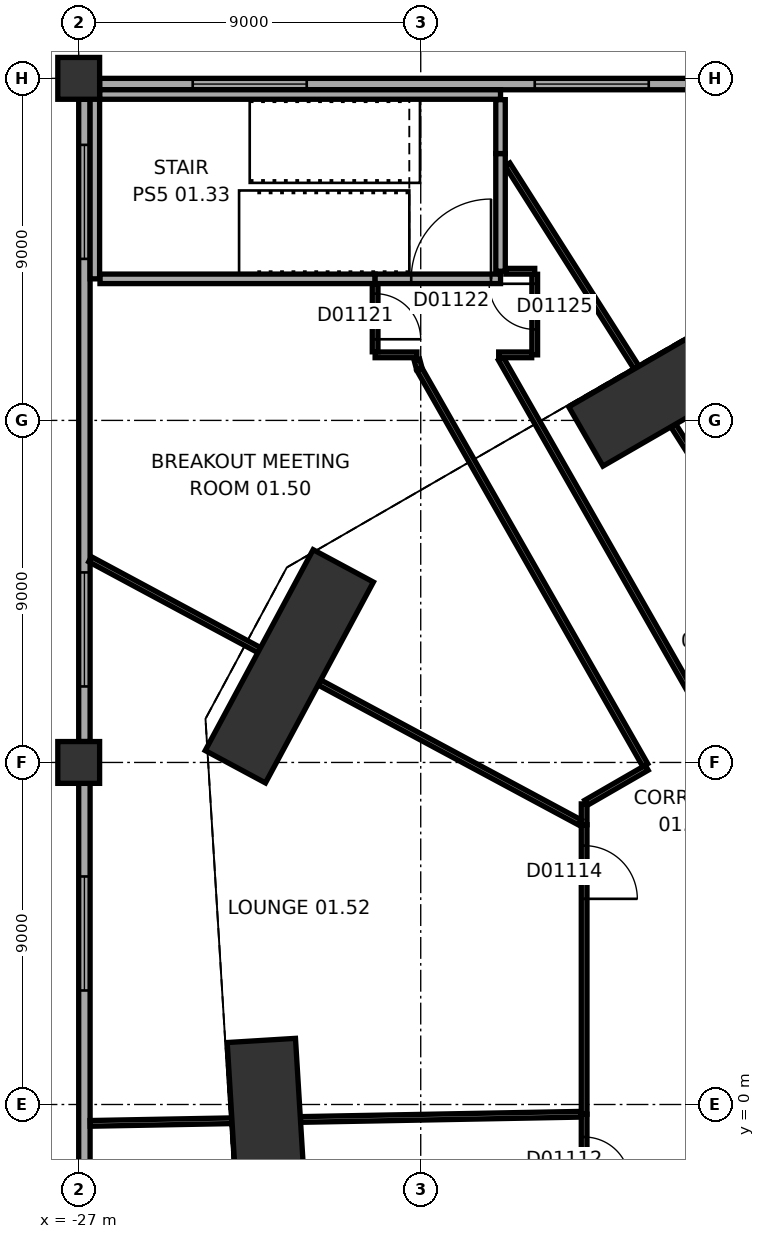
"""IFC4 building model, lengths in metres.
Left out: names, types, materials, properties, quantities, classifications, styles, units other than length and angle.
Written with IfcOpenShell. Run it as: python <this file> out.ifc"""

import sys

from ifc_helpers import new_model, si_unit, direction, frame, frame_2d, origin, origin_2d, place, context, subcontext, project, spatial, rectangle, extrude, element, fill, save


model = new_model("IFC4")
c1 = context("Model", 3, precision=1e-05, world=origin(), true_north=direction((0.0, 1.0)))
c2 = subcontext(c1, "Body", "Model", "MODEL_VIEW")
j1 = project(units=[si_unit("LENGTHUNIT", "METRE"), si_unit("PLANEANGLEUNIT", "RADIAN")], contexts=[c1])
p1 = place(None, origin())
s1 = spatial("IfcSite", under=j1, at=p1, CompositionType="ELEMENT")
p2 = place(p1, origin())
s2 = spatial("IfcBuilding", under=s1, at=p2, CompositionType="ELEMENT")
p3 = place(p2, frame((0.0, 0.0, 7.5)))
s3 = spatial("IfcBuildingStorey", under=s2, at=p3, CompositionType="ELEMENT", Elevation=7.5)
p4 = place(p3, frame((-11.837, 18.627, 0.0), z_axis=(0.0, 0.0, 1.0), x_axis=(-0.866028021766, -0.499995465495, 0.0)))
e1 = element("IfcColumn", 1, at=p4, inside=s3, PredefinedType="COLUMN", context=c2, shape_type="SweptSolid", body=[
    extrude(rectangle(XDim=4.2, YDim=1.8, at=origin_2d()), origin(), (0.0, 0.0, 1.0), 5.5),
])
p5 = place(p3, frame((-21.458, 11.53, 0.0), z_axis=(0.0, 0.0, 1.0), x_axis=(-0.473316592293, -0.880892390397, 0.0)))
e2 = element("IfcColumn", 2, at=p5, inside=s3, PredefinedType="COLUMN", context=c2, shape_type="SweptSolid", body=[
    extrude(rectangle(XDim=6.0, YDim=1.8, at=origin_2d()), origin(), (0.0, 0.0, 1.0), 5.5),
])
p6 = place(p3, frame((-22.066, -0.411, 0.0), z_axis=(0.0, 0.0, 1.0), x_axis=(0.061046797461, -0.99813490497, 0.0)))
e3 = element("IfcColumn", 3, at=p6, inside=s3, PredefinedType="COLUMN", context=c2, shape_type="SweptSolid", body=[
    extrude(rectangle(XDim=4.2, YDim=1.8, at=origin_2d()), origin(), (0.0, 0.0, 1.0), 5.5),
])
for number, where, z_axis, x_axis in (
    (4, (-27.0, 9.0, 0.0), (0.0, 0.0, 1.0), (1.0, 0.0, 0.0)),
    (5, (-27.0, 27.0, 0.0), (0.0, 0.0, 1.0), (1.0, 0.0, 0.0)),
):
    element("IfcColumn", number, at=place(p3, frame(where, z_axis=z_axis, x_axis=x_axis)), inside=s3, PredefinedType="COLUMN", context=c2, shape_type="SweptSolid", body=[
        extrude(rectangle(XDim=1.1, YDim=1.1, at=origin_2d()), origin(), (0.0, 0.0, 1.0), 5.5),
    ])
p7 = place(p3, frame((-9.55, 26.85, 0.0), z_axis=(0.0, 0.0, 1.0), x_axis=(-1.0, 0.0, 0.0)))
e6 = element("IfcWall", 6, at=p7, inside=s3, PredefinedType="STANDARD", context=c2, shape_type="SweptSolid", body=[
    extrude(rectangle(XDim=16.9, YDim=0.3, at=frame_2d((8.45, 0.0))), origin(), (0.0, 0.0, 1.0), 4.0),
])
p8 = place(p7, frame((2.45, 0.0, 1.0)))
e7 = element("IfcOpeningElement", 7, at=p8, cuts=e6, PredefinedType="OPENING", context=c2, shape_type="SweptSolid", body=[
    extrude(rectangle(XDim=3.0, YDim=2.6, at=frame_2d((1.5, 1.3))), frame((0.0, 0.16, 0.0), z_axis=(0.0, -1.0, 0.0), x_axis=(1.0, 0.0, 0.0)), (0.0, 0.0, 1.0), 0.32),
])
p9 = place(p7, frame((11.45, 0.0, 1.0)))
e8 = element("IfcOpeningElement", 8, at=p9, cuts=e6, PredefinedType="OPENING", context=c2, shape_type="SweptSolid", body=[
    extrude(rectangle(XDim=3.0, YDim=2.6, at=frame_2d((1.5, 1.3))), frame((0.0, 0.16, 0.0), z_axis=(0.0, -1.0, 0.0), x_axis=(1.0, 0.0, 0.0)), (0.0, 0.0, 1.0), 0.32),
])
p10 = place(p3, frame((-26.85, 26.45, 0.0), z_axis=(0.0, 0.0, 1.0), x_axis=(0.0, -1.0, 0.0)))
e9 = element("IfcWall", 9, at=p10, inside=s3, PredefinedType="STANDARD", context=c2, shape_type="SweptSolid", body=[
    extrude(rectangle(XDim=16.9, YDim=0.3, at=frame_2d((8.45, 0.0))), origin(), (0.0, 0.0, 1.0), 4.0),
])
p11 = place(p10, frame((1.2, 0.0, 1.0)))
e10 = element("IfcOpeningElement", 10, at=p11, cuts=e9, PredefinedType="OPENING", context=c2, shape_type="SweptSolid", body=[
    extrude(rectangle(XDim=3.0, YDim=2.6, at=frame_2d((1.5, 1.3))), frame((0.0, 0.16, 0.0), z_axis=(0.0, -1.0, 0.0), x_axis=(1.0, 0.0, 0.0)), (0.0, 0.0, 1.0), 0.32),
])
p12 = place(p10, frame((12.45, 0.0, 1.0)))
e11 = element("IfcOpeningElement", 11, at=p12, cuts=e9, PredefinedType="OPENING", context=c2, shape_type="SweptSolid", body=[
    extrude(rectangle(XDim=3.0, YDim=2.6, at=frame_2d((1.5, 1.3))), frame((0.0, 0.16, 0.0), z_axis=(0.0, -1.0, 0.0), x_axis=(1.0, 0.0, 0.0)), (0.0, 0.0, 1.0), 0.32),
])
p13 = place(p3, frame((-26.85, 8.45, 0.0), z_axis=(0.0, 0.0, 1.0), x_axis=(0.0, -1.0, 0.0)))
e12 = element("IfcWall", 12, at=p13, inside=s3, PredefinedType="STANDARD", context=c2, shape_type="SweptSolid", body=[
    extrude(rectangle(XDim=16.9, YDim=0.3, at=frame_2d((8.45, 0.0))), origin(), (0.0, 0.0, 1.0), 4.0),
])
p14 = place(p13, frame((2.45, 0.0, 1.0)))
e13 = element("IfcOpeningElement", 13, at=p14, cuts=e12, PredefinedType="OPENING", context=c2, shape_type="SweptSolid", body=[
    extrude(rectangle(XDim=3.0, YDim=2.6, at=frame_2d((1.5, 1.3))), frame((0.0, 0.16, 0.0), z_axis=(0.0, -1.0, 0.0), x_axis=(1.0, 0.0, 0.0)), (0.0, 0.0, 1.0), 0.32),
])
p15 = place(p13, frame((11.45, 0.0, 1.0)))
e14 = element("IfcOpeningElement", 14, at=p15, cuts=e12, PredefinedType="OPENING", context=c2, shape_type="SweptSolid", body=[
    extrude(rectangle(XDim=3.0, YDim=2.6, at=frame_2d((1.5, 1.3))), frame((0.0, 0.16, 0.0), z_axis=(0.0, -1.0, 0.0), x_axis=(1.0, 0.0, 0.0)), (0.0, 0.0, 1.0), 0.32),
])
p16 = place(p3, frame((-13.7, -7.909, 0.0), z_axis=(0.0, 0.0, 1.0), x_axis=(0.0, 1.0, 0.0)))
e15 = element("IfcWall", 15, at=p16, inside=s3, PredefinedType="PARTITIONING", context=c2, shape_type="SweptSolid", body=[
    extrude(rectangle(XDim=7.655, YDim=0.15, at=frame_2d((3.827, 0.0))), origin(), (0.0, 0.0, 1.0), 5.2),
])
p17 = place(p16, frame((5.854, 0.0, 0.0)))
e16 = element("IfcOpeningElement", 16, at=p17, cuts=e15, PredefinedType="OPENING", context=c2, shape_type="SweptSolid", body=[
    extrude(rectangle(XDim=1.2, YDim=2.1, at=frame_2d((0.6, 1.05))), frame((0.0, 0.085, 0.0), z_axis=(0.0, -1.0, 0.0), x_axis=(1.0, 0.0, 0.0)), (0.0, 0.0, 1.0), 0.17),
])
p18 = place(p3, frame((-22.967, -0.427, 0.0), z_axis=(0.0, 0.0, 1.0), x_axis=(-0.999826372694, -0.018633959993, 0.0)))
e17 = element("IfcWall", 17, at=p18, inside=s3, PredefinedType="PARTITIONING", context=c2, shape_type="SweptSolid", body=[
    extrude(rectangle(XDim=3.734, YDim=0.15, at=frame_2d((1.867, 0.0))), origin(), (0.0, 0.0, 1.0), 5.2),
])
p19 = place(p3, frame((-13.78, -0.257, 0.0), z_axis=(0.0, 0.0, 1.0), x_axis=(-0.999826849708, -0.018608347649, 0.0)))
e18 = element("IfcWall", 18, at=p19, inside=s3, PredefinedType="MOVABLE", context=c2, shape_type="SweptSolid", body=[
    extrude(rectangle(XDim=7.386, YDim=0.15, at=frame_2d((3.693, 0.0))), origin(), (0.0, 0.0, 1.0), 5.2),
])
p20 = place(p3, frame((-13.7, -0.255, 0.0), z_axis=(0.0, 0.0, 1.0), x_axis=(0.0, 1.0, 0.0)))
e19 = element("IfcWall", 19, at=p20, inside=s3, PredefinedType="PARTITIONING", context=c2, shape_type="SweptSolid", body=[
    extrude(rectangle(XDim=7.616, YDim=0.15, at=frame_2d((3.808, 0.0))), origin(), (0.0, 0.0, 1.0), 5.2),
])
p21 = place(p20, frame((5.667, 0.0, 0.0)))
e20 = element("IfcOpeningElement", 20, at=p21, cuts=e19, PredefinedType="OPENING", context=c2, shape_type="SweptSolid", body=[
    extrude(rectangle(XDim=1.4, YDim=2.4, at=frame_2d((0.7, 1.2))), frame((0.0, 0.085, 0.0), z_axis=(0.0, -1.0, 0.0), x_axis=(1.0, 0.0, 0.0)), (0.0, 0.0, 1.0), 0.17),
])
p22 = place(p3, frame((-13.7, 7.362, 0.0), z_axis=(0.0, 0.0, 1.0), x_axis=(0.0, 1.0, 0.0)))
e21 = element("IfcWall", 21, at=p22, inside=s3, PredefinedType="PARTITIONING", context=c2, shape_type="SweptSolid", body=[
    extrude(rectangle(XDim=0.548, YDim=0.15, at=frame_2d((0.274, 0.0))), origin(), (0.0, 0.0, 1.0), 5.2),
])
p23 = place(p3, frame((-13.806, 7.418, 0.0), z_axis=(0.0, 0.0, 1.0), x_axis=(-0.880891557551, 0.473318142305, 0.0)))
e22 = element("IfcWall", 22, at=p23, inside=s3, PredefinedType="MOVABLE", context=c2, shape_type="SweptSolid", body=[
    extrude(rectangle(XDim=7.787, YDim=0.15, at=frame_2d((3.894, 0.0))), origin(), (0.0, 0.0, 1.0), 5.2),
])
p24 = place(p3, frame((-13.648, 7.939, 0.0), z_axis=(0.0, 0.0, 1.0), x_axis=(0.866024486176, 0.500001589341, 0.0)))
e23 = element("IfcWall", 23, at=p24, inside=s3, PredefinedType="PARTITIONING", context=c2, shape_type="SweptSolid", body=[
    extrude(rectangle(XDim=1.842, YDim=0.15, at=frame_2d((0.921, 0.0))), origin(), (0.0, 0.0, 1.0), 5.2),
])
p25 = place(p3, frame((-12.092, 8.93, 0.0), z_axis=(0.0, 0.0, 1.0), x_axis=(-0.495564220718, 0.868571299977, 0.0)))
e24 = element("IfcWall", 24, at=p25, inside=s3, PredefinedType="PARTITIONING", context=c2, shape_type="SweptSolid", body=[
    extrude(rectangle(XDim=11.988, YDim=0.15, at=frame_2d((5.994, 0.0))), origin(), (0.0, 0.0, 1.0), 5.2),
])
p26 = place(p3, frame((-7.397, 11.641, 0.0), z_axis=(0.0, 0.0, 1.0), x_axis=(-0.536312130721, 0.844019726334, 0.0)))
e25 = element("IfcWall", 25, at=p26, inside=s3, PredefinedType="PARTITIONING", context=c2, shape_type="SweptSolid", body=[
    extrude(rectangle(XDim=7.376, YDim=0.15, at=frame_2d((3.688, 0.0))), origin(), (0.0, 0.0, 1.0), 5.2),
])
p27 = place(p3, frame((-22.251, 11.956, 0.0), z_axis=(0.0, 0.0, 1.0), x_axis=(-0.880902248523, 0.473298244817, 0.0)))
e26 = element("IfcWall", 26, at=p27, inside=s3, PredefinedType="PARTITIONING", context=c2, shape_type="SweptSolid", body=[
    extrude(rectangle(XDim=5.051, YDim=0.15, at=frame_2d((2.525, 0.0))), origin(), (0.0, 0.0, 1.0), 5.2),
])
p28 = place(p3, frame((-18.038, 19.362, 0.0), z_axis=(0.0, 0.0, 1.0), x_axis=(-0.257536433885, 0.966268588552, 0.0)))
e27 = element("IfcWall", 27, at=p28, inside=s3, PredefinedType="PARTITIONING", context=c2, shape_type="SweptSolid", body=[
    extrude(rectangle(XDim=0.241, YDim=0.15, at=frame_2d((0.12, 0.0))), origin(), (0.0, 0.0, 1.0), 5.2),
])
p29 = place(p3, frame((-12.32, 19.387, 0.0), z_axis=(0.0, 0.0, 1.0), x_axis=(-0.536309341483, 0.844021498682, 0.0)))
e28 = element("IfcWall", 28, at=p29, inside=s3, PredefinedType="PARTITIONING", context=c2, shape_type="SweptSolid", body=[
    extrude(rectangle(XDim=6.335, YDim=0.15, at=frame_2d((3.168, 0.0))), origin(), (0.0, 0.0, 1.0), 5.2),
])
p30 = place(p3, frame((-15.889, 19.621, 0.0), z_axis=(0.0, 0.0, 1.0), x_axis=(0.495540263005, -0.868584968636, 0.0)))
e29 = element("IfcWall", 29, at=p30, inside=s3, PredefinedType="PARTITIONING", context=c2, shape_type="SweptSolid", body=[
    extrude(rectangle(XDim=11.157, YDim=0.15, at=frame_2d((5.579, 0.0))), origin(), (0.0, 0.0, 1.0), 5.2),
])
p31 = place(p3, frame((-18.1, 19.725, 0.0), z_axis=(0.0, 0.0, 1.0), x_axis=(-1.0, 0.0, 0.0)))
e30 = element("IfcWall", 30, at=p31, inside=s3, PredefinedType="PARTITIONING", context=c2, shape_type="SweptSolid", body=[
    extrude(rectangle(XDim=1.1, YDim=0.15, at=frame_2d((0.55, 0.0))), origin(), (0.0, 0.0, 1.0), 5.2),
])
p32 = place(p3, frame((-15.08, 19.725, 0.0), z_axis=(0.0, 0.0, 1.0), x_axis=(-1.0, 0.0, 0.0)))
e31 = element("IfcWall", 31, at=p32, inside=s3, PredefinedType="PARTITIONING", context=c2, shape_type="SweptSolid", body=[
    extrude(rectangle(XDim=0.868, YDim=0.15, at=frame_2d((0.434, 0.0))), origin(), (0.0, 0.0, 1.0), 5.2),
])
p33 = place(p3, frame((-19.2, 19.805, 0.0), z_axis=(0.0, 0.0, 1.0), x_axis=(0.0, 1.0, 0.0)))
e32 = element("IfcWall", 32, at=p33, inside=s3, PredefinedType="PARTITIONING", context=c2, shape_type="SweptSolid", body=[
    extrude(rectangle(XDim=1.78, YDim=0.15, at=frame_2d((0.89, 0.0))), origin(), (0.0, 0.0, 1.0), 5.2),
])
p34 = place(p33, frame((0.33, 0.0, 0.0)))
e33 = element("IfcOpeningElement", 33, at=p34, cuts=e32, PredefinedType="OPENING", context=c2, shape_type="SweptSolid", body=[
    extrude(rectangle(XDim=1.2, YDim=2.1, at=frame_2d((0.6, 1.05))), frame((0.0, 0.085, 0.0), z_axis=(0.0, -1.0, 0.0), x_axis=(1.0, 0.0, 0.0)), (0.0, 0.0, 1.0), 0.17),
])
p35 = place(p3, frame((-19.2, 21.725, 0.0), z_axis=(0.0, 0.0, 1.0), x_axis=(-1.0, 0.0, 0.0)))
e34 = element("IfcWall", 34, at=p35, inside=s3, PredefinedType="SOLIDWALL", context=c2, shape_type="SweptSolid", body=[
    extrude(rectangle(XDim=7.24, YDim=0.25, at=frame_2d((3.62, 0.0))), origin(), (0.0, 0.0, 1.0), 5.2),
])
p36 = place(p3, frame((-15.9, 21.725, 0.0), z_axis=(0.0, 0.0, 1.0), x_axis=(-1.0, 0.0, 0.0)))
e35 = element("IfcWall", 35, at=p36, inside=s3, PredefinedType="SOLIDWALL", context=c2, shape_type="SweptSolid", body=[
    extrude(rectangle(XDim=3.3, YDim=0.25, at=frame_2d((1.65, 0.0))), origin(), (0.0, 0.0, 1.0), 5.2),
])
p37 = place(p36, frame((0.25, 0.0, 0.0)))
e36 = element("IfcOpeningElement", 36, at=p37, cuts=e35, PredefinedType="OPENING", context=c2, shape_type="SweptSolid", body=[
    extrude(rectangle(XDim=2.1, YDim=2.4, at=frame_2d((1.05, 1.2))), frame((0.0, 0.135, 0.0), z_axis=(0.0, -1.0, 0.0), x_axis=(1.0, 0.0, 0.0)), (0.0, 0.0, 1.0), 0.27),
])
p38 = place(p3, frame((-15.0, 21.845, 0.0), z_axis=(0.0, 0.0, 1.0), x_axis=(0.0, -1.0, 0.0)))
e37 = element("IfcWall", 37, at=p38, inside=s3, PredefinedType="PARTITIONING", context=c2, shape_type="SweptSolid", body=[
    extrude(rectangle(XDim=2.12, YDim=0.15, at=frame_2d((1.06, 0.0))), origin(), (0.0, 0.0, 1.0), 5.2),
])
p39 = place(p38, frame((0.25, 0.0, 0.0)))
e38 = element("IfcOpeningElement", 38, at=p39, cuts=e37, PredefinedType="OPENING", context=c2, shape_type="SweptSolid", body=[
    extrude(rectangle(XDim=1.2, YDim=2.1, at=frame_2d((0.6, 1.05))), frame((0.0, 0.085, 0.0), z_axis=(0.0, -1.0, 0.0), x_axis=(1.0, 0.0, 0.0)), (0.0, 0.0, 1.0), 0.17),
])
p40 = place(p3, frame((-15.76, 21.925, 0.0), z_axis=(0.0, 0.0, 1.0), x_axis=(1.0, 0.0, 0.0)))
e39 = element("IfcWall", 39, at=p40, inside=s3, PredefinedType="PARTITIONING", context=c2, shape_type="SweptSolid", body=[
    extrude(rectangle(XDim=0.76, YDim=0.15, at=frame_2d((0.38, 0.0))), origin(), (0.0, 0.0, 1.0), 5.2),
])
p41 = place(p3, frame((-15.9, 25.021, 0.0), z_axis=(0.0, 0.0, 1.0), x_axis=(0.0, -1.0, 0.0)))
e40 = element("IfcWall", 40, at=p41, inside=s3, PredefinedType="SOLIDWALL", context=c2, shape_type="SweptSolid", body=[
    extrude(rectangle(XDim=3.096, YDim=0.25, at=frame_2d((1.548, 0.0))), origin(), (0.0, 0.0, 1.0), 5.2),
])
p42 = place(p3, frame((-15.9, 26.44, 0.0), z_axis=(0.0, 0.0, 1.0), x_axis=(0.0, -1.0, 0.0)))
e41 = element("IfcWall", 41, at=p42, inside=s3, PredefinedType="SOLIDWALL", context=c2, shape_type="SweptSolid", body=[
    extrude(rectangle(XDim=1.418, YDim=0.25, at=frame_2d((0.709, 0.0))), origin(), (0.0, 0.0, 1.0), 5.2),
])
p43 = place(p3, frame((-26.575, 21.725, 0.0), z_axis=(0.0, 0.0, 1.0), x_axis=(0.0, 1.0, 0.0)))
e42 = element("IfcWall", 42, at=p43, inside=s3, PredefinedType="SOLIDWALL", context=c2, shape_type="SweptSolid", body=[
    extrude(rectangle(XDim=4.975, YDim=0.25, at=frame_2d((2.487, 0.0))), origin(), (0.0, 0.0, 1.0), 5.2),
])
p44 = place(p3, frame((-26.45, 26.575, 0.0), z_axis=(0.0, 0.0, 1.0), x_axis=(1.0, 0.0, 0.0)))
e43 = element("IfcWall", 43, at=p44, inside=s3, PredefinedType="SOLIDWALL", context=c2, shape_type="SweptSolid", body=[
    extrude(rectangle(XDim=10.55, YDim=0.25, at=frame_2d((5.275, 0.0))), origin(), (0.0, 0.0, 1.0), 5.2),
])
p45 = place(p8, origin())
e44 = element("IfcWindow", 44, at=p45, inside=s3, PartitioningType="SINGLE_PANEL", PredefinedType="WINDOW", context=c2, shape_type="SweptSolid", body=[
    extrude(rectangle(XDim=3.0, YDim=2.6, at=frame_2d((1.5, 1.3))), frame((0.0, 0.03, 0.0), z_axis=(0.0, -1.0, 0.0), x_axis=(1.0, 0.0, 0.0)), (0.0, 0.0, 1.0), 0.06),
])
fill(e7, e44)
p46 = place(p9, origin())
e45 = element("IfcWindow", 45, at=p46, inside=s3, PartitioningType="SINGLE_PANEL", PredefinedType="WINDOW", context=c2, shape_type="SweptSolid", body=[
    extrude(rectangle(XDim=3.0, YDim=2.6, at=frame_2d((1.5, 1.3))), frame((0.0, 0.03, 0.0), z_axis=(0.0, -1.0, 0.0), x_axis=(1.0, 0.0, 0.0)), (0.0, 0.0, 1.0), 0.06),
])
fill(e8, e45)
p47 = place(p11, origin())
e46 = element("IfcWindow", 46, at=p47, inside=s3, PartitioningType="SINGLE_PANEL", PredefinedType="WINDOW", context=c2, shape_type="SweptSolid", body=[
    extrude(rectangle(XDim=3.0, YDim=2.6, at=frame_2d((1.5, 1.3))), frame((0.0, 0.03, 0.0), z_axis=(0.0, -1.0, 0.0), x_axis=(1.0, 0.0, 0.0)), (0.0, 0.0, 1.0), 0.06),
])
fill(e10, e46)
p48 = place(p12, origin())
e47 = element("IfcWindow", 47, at=p48, inside=s3, PartitioningType="SINGLE_PANEL", PredefinedType="WINDOW", context=c2, shape_type="SweptSolid", body=[
    extrude(rectangle(XDim=3.0, YDim=2.6, at=frame_2d((1.5, 1.3))), frame((0.0, 0.03, 0.0), z_axis=(0.0, -1.0, 0.0), x_axis=(1.0, 0.0, 0.0)), (0.0, 0.0, 1.0), 0.06),
])
fill(e11, e47)
p49 = place(p14, origin())
e48 = element("IfcWindow", 48, at=p49, inside=s3, PartitioningType="SINGLE_PANEL", PredefinedType="WINDOW", context=c2, shape_type="SweptSolid", body=[
    extrude(rectangle(XDim=3.0, YDim=2.6, at=frame_2d((1.5, 1.3))), frame((0.0, 0.03, 0.0), z_axis=(0.0, -1.0, 0.0), x_axis=(1.0, 0.0, 0.0)), (0.0, 0.0, 1.0), 0.06),
])
fill(e13, e48)
p50 = place(p17, origin())
e49 = element("IfcDoor", 49, at=p50, inside=s3, OperationType="SINGLE_SWING_LEFT", PredefinedType="DOOR", context=c2, shape_type="SweptSolid", body=[
    extrude(rectangle(XDim=1.2, YDim=2.1, at=frame_2d((0.6, 1.05))), frame((0.0, 0.025, 0.0), z_axis=(0.0, -1.0, 0.0), x_axis=(1.0, 0.0, 0.0)), (0.0, 0.0, 1.0), 0.05),
])
fill(e16, e49)
p51 = place(p21, origin())
e50 = element("IfcDoor", 50, at=p51, inside=s3, OperationType="SINGLE_SWING_LEFT", PredefinedType="DOOR", context=c2, shape_type="SweptSolid", body=[
    extrude(rectangle(XDim=1.4, YDim=2.4, at=frame_2d((0.7, 1.2))), frame((0.0, 0.025, 0.0), z_axis=(0.0, -1.0, 0.0), x_axis=(1.0, 0.0, 0.0)), (0.0, 0.0, 1.0), 0.05),
])
fill(e20, e50)
p52 = place(p34, origin())
e51 = element("IfcDoor", 51, at=p52, inside=s3, OperationType="SINGLE_SWING_LEFT", PredefinedType="DOOR", context=c2, shape_type="SweptSolid", body=[
    extrude(rectangle(XDim=1.2, YDim=2.1, at=frame_2d((0.6, 1.05))), frame((0.0, 0.025, 0.0), z_axis=(0.0, -1.0, 0.0), x_axis=(1.0, 0.0, 0.0)), (0.0, 0.0, 1.0), 0.05),
])
fill(e33, e51)
p53 = place(p37, frame((2.1, 0.0, 0.0), z_axis=(0.0, 0.0, 1.0), x_axis=(-1.0, 0.0, 0.0)))
e52 = element("IfcDoor", 52, at=p53, inside=s3, OperationType="DOUBLE_DOOR_SINGLE_SWING", PredefinedType="DOOR", context=c2, shape_type="SweptSolid", body=[
    extrude(rectangle(XDim=2.1, YDim=2.4, at=frame_2d((1.05, 1.2))), frame((0.0, 0.025, 0.0), z_axis=(0.0, -1.0, 0.0), x_axis=(1.0, 0.0, 0.0)), (0.0, 0.0, 1.0), 0.05),
])
fill(e36, e52)
p54 = place(p39, origin())
e53 = element("IfcDoor", 53, at=p54, inside=s3, OperationType="SINGLE_SWING_LEFT", PredefinedType="DOOR", context=c2, shape_type="SweptSolid", body=[
    extrude(rectangle(XDim=1.2, YDim=2.1, at=frame_2d((0.6, 1.05))), frame((0.0, 0.025, 0.0), z_axis=(0.0, -1.0, 0.0), x_axis=(1.0, 0.0, 0.0)), (0.0, 0.0, 1.0), 0.05),
])
fill(e38, e53)
save(model, sys.argv[1])
